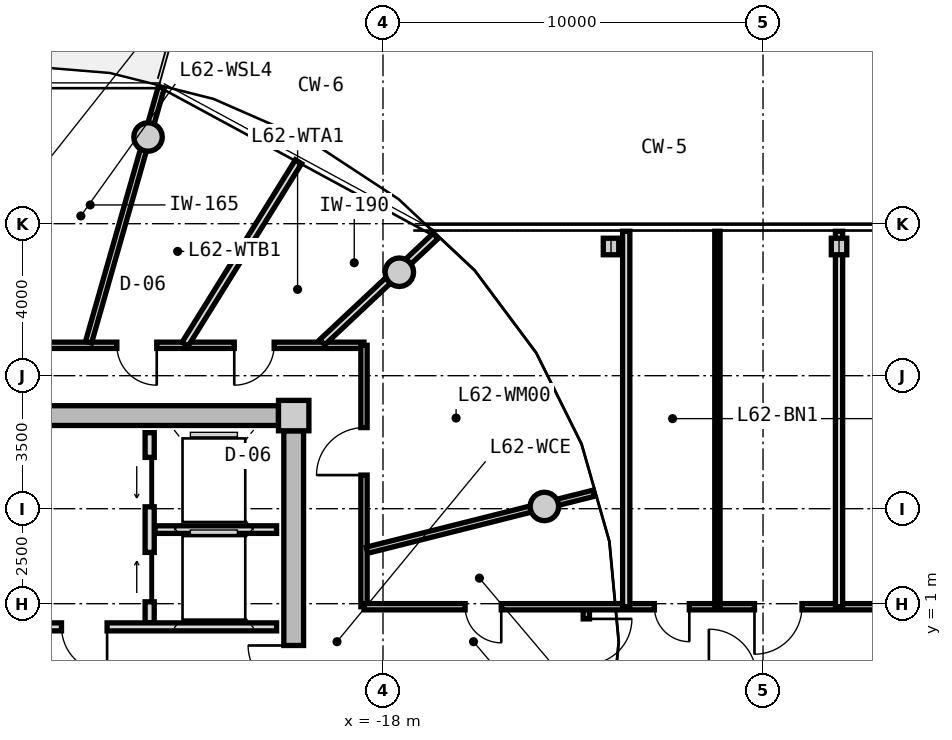
"""IFC4 building model, lengths in metres.
Left out: names, types, materials, properties, quantities, classifications, styles, units other than length and angle.
Written with IfcOpenShell. Run it as: python <this file> out.ifc"""

import sys

from ifc_helpers import new_model, si_unit, direction, frame, frame_2d, origin, origin_2d, place, context, subcontext, project, spatial, rectangle, circle, i_section, extrude, source, transform, mapped, element, fill, save


model = new_model("IFC4")
c1 = context("Model", 3, precision=1e-05, world=origin(), true_north=direction((0.0, 1.0)))
c2 = subcontext(c1, "Body", "Model", "MODEL_VIEW")
j1 = project(units=[si_unit("LENGTHUNIT", "METRE"), si_unit("PLANEANGLEUNIT", "RADIAN")], contexts=[c1])
p1 = place(None, origin())
s1 = spatial("IfcSite", under=j1, at=p1, CompositionType="ELEMENT")
p2 = place(p1, origin())
s2 = spatial("IfcBuilding", under=s1, at=p2, CompositionType="ELEMENT")
p3 = place(p2, frame((0.0, 0.0, 199.8)))
s3 = spatial("IfcBuildingStorey", under=s2, at=p3, CompositionType="ELEMENT", Elevation=199.8)
m1 = source(origin(), c2, "Body", "SweptSolid", [
    extrude(rectangle(XDim=0.8, YDim=0.8, at=origin_2d()), origin(), (0.0, 0.0, 1.0), 4.0),
])
p4 = place(p3, frame((-20.35, 5.95, 0.0), z_axis=(0.0, 0.0, 1.0), x_axis=(1.0, 0.0, 0.0)))
e1 = element("IfcColumn", 1, at=p4, inside=s3, PredefinedType="COLUMN", context=c2, shape_type="MappedRepresentation", body=[
    mapped(m1, transform((0.0, 0.0, 0.0), x_axis=(1.0, 0.0, 0.0), y_axis=(0.0, 1.0, 0.0), z_axis=(0.0, 0.0, 1.0), scale=1.0)),
])
m2 = source(origin(), c2, "Body", "SweptSolid", [
    extrude(rectangle(XDim=14.5, YDim=0.52, at=frame_2d((7.25, 0.0))), origin(), (0.0, 0.0, 1.0), 3.71),
])
p5 = place(p3, frame((-35.25, 5.95, 0.0), z_axis=(0.0, 0.0, 1.0), x_axis=(1.0, 0.0, 0.0)))
e2 = element("IfcWall", 2, at=p5, inside=s3, PredefinedType="SHEAR", context=c2, shape_type="MappedRepresentation", body=[
    mapped(m2, transform((0.0, 0.0, 0.0), x_axis=(1.0, 0.0, 0.0), y_axis=(0.0, 1.0, 0.0), z_axis=(0.0, 0.0, 1.0), scale=1.0)),
])
m3 = source(origin(), c2, "Body", "SweptSolid", [
    extrude(rectangle(XDim=11.1, YDim=0.52, at=frame_2d((5.55, 0.0))), origin(), (0.0, 0.0, 1.0), 3.71),
])
p6 = place(p3, frame((-20.35, 5.55, 0.0), z_axis=(0.0, 0.0, 1.0), x_axis=(0.0, -1.0, 0.0)))
e3 = element("IfcWall", 3, at=p6, inside=s3, PredefinedType="SHEAR", context=c2, shape_type="MappedRepresentation", body=[
    mapped(m3, transform((0.0, 0.0, 0.0), x_axis=(1.0, 0.0, 0.0), y_axis=(0.0, 1.0, 0.0), z_axis=(0.0, 0.0, 1.0), scale=1.0)),
])
p7 = place(p6, frame((5.65, 0.0, 0.0)))
e4 = element("IfcOpeningElement", 4, at=p7, cuts=e3, PredefinedType="OPENING", context=c2, shape_type="SweptSolid", body=[
    extrude(rectangle(XDim=1.2, YDim=2.15, at=frame_2d((0.6, 1.075))), frame((0.0, 0.27, 0.0), z_axis=(0.0, -1.0, 0.0), x_axis=(1.0, 0.0, 0.0)), (0.0, 0.0, 1.0), 0.54),
])
m4 = source(origin(), c2, "Body", "SweptSolid", [
    extrude(circle(Radius=0.375, at=origin_2d()), origin(), (0.0, 0.0, 1.0), 4.0),
])
for number, where, z_axis, x_axis in (
    (5, (-13.753, 3.559, 0.0), (0.0, 0.0, 1.0), (1.0, 0.0, 0.0)),
    (6, (-17.57, 9.723, 0.0), (0.0, 0.0, 1.0), (1.0, 0.0, 0.0)),
    (7, (-24.182, 13.281, 0.0), (0.0, 0.0, 1.0), (1.0, 0.0, 0.0)),
):
    element("IfcColumn", number, at=place(p3, frame(where, z_axis=z_axis, x_axis=x_axis)), inside=s3, PredefinedType="COLUMN", context=c2, shape_type="MappedRepresentation", body=[
        mapped(m4, transform((0.0, 0.0, 0.0), x_axis=(1.0, 0.0, 0.0), y_axis=(0.0, 1.0, 0.0), z_axis=(0.0, 0.0, 1.0), scale=1.0)),
    ])
m5 = source(origin(), c2, "Body", "SweptSolid", [
    extrude(i_section(OverallWidth=0.407, OverallDepth=0.435, WebThickness=0.024, FlangeThickness=0.039, FilletRadius=0.015, at=origin_2d()), origin(), (0.0, 0.0, 1.0), 4.42),
])
for number, where, z_axis, x_axis in (
    (8, (-12.0, 10.4, -0.42), (0.0, 0.0, 1.0), (1.0, 0.0, 0.0)),
    (9, (-6.0, 10.4, -0.42), (0.0, 0.0, 1.0), (1.0, 0.0, 0.0)),
):
    element("IfcColumn", number, at=place(p3, frame(where, z_axis=z_axis, x_axis=x_axis)), inside=s3, PredefinedType="COLUMN", context=c2, shape_type="MappedRepresentation", body=[
        mapped(m5, transform((0.0, 0.0, 0.0), x_axis=(1.0, 0.0, 0.0), y_axis=(0.0, 1.0, 0.0), z_axis=(0.0, 0.0, 1.0), scale=1.0)),
    ])
m6 = source(origin(), c2, "Body", "SweptSolid", [
    extrude(rectangle(XDim=5.0, YDim=0.24, at=frame_2d((2.5, 0.0))), origin(), (0.0, 0.0, 1.0), 3.695),
])
p8 = place(p3, frame((-24.14, 0.5, 0.0), z_axis=(0.0, 0.0, 1.0), x_axis=(0.0, 1.0, 0.0)))
e10 = element("IfcWall", 10, at=p8, inside=s3, PredefinedType="PARTITIONING", context=c2, shape_type="MappedRepresentation", body=[
    mapped(m6, transform((0.0, 0.0, 0.0), x_axis=(1.0, 0.0, 0.0), y_axis=(0.0, 1.0, 0.0), z_axis=(0.0, 0.0, 1.0), scale=1.0)),
])
p9 = place(p8, frame((3.05, 0.0, 0.0)))
e11 = element("IfcOpeningElement", 11, at=p9, cuts=e10, PredefinedType="OPENING", context=c2, shape_type="SweptSolid", body=[
    extrude(rectangle(XDim=1.3, YDim=2.2, at=frame_2d((0.65, 1.1))), frame((0.0, 0.13, 0.0), z_axis=(0.0, -1.0, 0.0), x_axis=(1.0, 0.0, 0.0)), (0.0, 0.0, 1.0), 0.26),
])
p10 = place(p8, frame((0.55, 0.0, 0.0)))
e12 = element("IfcOpeningElement", 12, at=p10, cuts=e10, PredefinedType="OPENING", context=c2, shape_type="SweptSolid", body=[
    extrude(rectangle(XDim=1.3, YDim=2.2, at=frame_2d((0.65, 1.1))), frame((0.0, 0.13, 0.0), z_axis=(0.0, -1.0, 0.0), x_axis=(1.0, 0.0, 0.0)), (0.0, 0.0, 1.0), 0.26),
])
m7 = source(origin(), c2, "Body", "SweptSolid", [
    extrude(rectangle(XDim=3.2, YDim=0.2, at=frame_2d((1.6, 0.0))), origin(), (0.0, 0.0, 1.0), 3.695),
])
p11 = place(p3, frame((-24.0, 2.95, 0.0), z_axis=(0.0, 0.0, 1.0), x_axis=(1.0, 0.0, 0.0)))
e13 = element("IfcWall", 13, at=p11, inside=s3, PredefinedType="PARTITIONING", context=c2, shape_type="MappedRepresentation", body=[
    mapped(m7, transform((0.0, 0.0, 0.0), x_axis=(1.0, 0.0, 0.0), y_axis=(0.0, 1.0, 0.0), z_axis=(0.0, 0.0, 1.0), scale=1.0)),
])
m8 = source(origin(), c2, "Body", "SweptSolid", [
    extrude(rectangle(XDim=6.66, YDim=0.21, at=frame_2d((3.33, 0.0))), origin(), (0.0, 0.0, 1.0), 3.695),
])
p12 = place(p3, frame((-27.46, 0.39, 0.0), z_axis=(0.0, 0.0, 1.0), x_axis=(1.0, 0.0, 0.0)))
e14 = element("IfcWall", 14, at=p12, inside=s3, PredefinedType="PARTITIONING", context=c2, shape_type="MappedRepresentation", body=[
    mapped(m8, transform((0.0, 0.0, 0.0), x_axis=(1.0, 0.0, 0.0), y_axis=(0.0, 1.0, 0.0), z_axis=(0.0, 0.0, 1.0), scale=1.0)),
])
p13 = place(p12, frame((1.0, 0.0, 0.0)))
e15 = element("IfcOpeningElement", 15, at=p13, cuts=e14, PredefinedType="OPENING", context=c2, shape_type="SweptSolid", body=[
    extrude(rectangle(XDim=1.2, YDim=2.15, at=frame_2d((0.6, 1.075))), frame((0.0, 0.115, 0.0), z_axis=(0.0, -1.0, 0.0), x_axis=(1.0, 0.0, 0.0)), (0.0, 0.0, 1.0), 0.23),
])
m9 = source(origin(), c2, "Body", "SweptSolid", [
    extrude(rectangle(XDim=8.58, YDim=0.165, at=frame_2d((4.29, 0.0))), origin(), (0.0, 0.0, 1.0), 3.695),
])
p14 = place(p3, frame((-27.08, 7.8, 0.0), z_axis=(0.0, 0.0, 1.0), x_axis=(1.0, 0.0, 0.0)))
e16 = element("IfcWall", 16, at=p14, inside=s3, PredefinedType="PARTITIONING", context=c2, shape_type="MappedRepresentation", body=[
    mapped(m9, transform((0.0, 0.0, 0.0), x_axis=(1.0, 0.0, 0.0), y_axis=(0.0, 1.0, 0.0), z_axis=(0.0, 0.0, 1.0), scale=1.0)),
])
p15 = place(p14, frame((5.166, 0.0, 0.0)))
e17 = element("IfcOpeningElement", 17, at=p15, cuts=e16, PredefinedType="OPENING", context=c2, shape_type="SweptSolid", body=[
    extrude(rectangle(XDim=1.05, YDim=2.15, at=frame_2d((0.525, 1.075))), frame((0.0, 0.093, 0.0), z_axis=(0.0, -1.0, 0.0), x_axis=(1.0, 0.0, 0.0)), (0.0, 0.0, 1.0), 0.185),
])
p16 = place(p14, frame((2.076, 0.0, 0.0)))
e18 = element("IfcOpeningElement", 18, at=p16, cuts=e16, PredefinedType="OPENING", context=c2, shape_type="SweptSolid", body=[
    extrude(rectangle(XDim=1.05, YDim=2.15, at=frame_2d((0.525, 1.075))), frame((0.0, 0.093, 0.0), z_axis=(0.0, -1.0, 0.0), x_axis=(1.0, 0.0, 0.0)), (0.0, 0.0, 1.0), 0.185),
])
m10 = source(origin(), c2, "Body", "SweptSolid", [
    extrude(rectangle(XDim=6.88, YDim=0.165, at=frame_2d((3.44, 0.0))), origin(), (0.0, 0.0, 1.0), 3.695),
])
p17 = place(p3, frame((-18.5, 7.8, 0.0), z_axis=(0.0, 0.0, 1.0), x_axis=(0.0, -1.0, 0.0)))
e19 = element("IfcWall", 19, at=p17, inside=s3, PredefinedType="PARTITIONING", context=c2, shape_type="MappedRepresentation", body=[
    mapped(m10, transform((0.0, 0.0, 0.0), x_axis=(1.0, 0.0, 0.0), y_axis=(0.0, 1.0, 0.0), z_axis=(0.0, 0.0, 1.0), scale=1.0)),
])
p18 = place(p17, frame((2.166, 0.0, 0.0)))
e20 = element("IfcOpeningElement", 20, at=p18, cuts=e19, PredefinedType="OPENING", context=c2, shape_type="SweptSolid", body=[
    extrude(rectangle(XDim=1.25, YDim=2.2, at=frame_2d((0.625, 1.1))), frame((0.0, 0.093, 0.0), z_axis=(0.0, -1.0, 0.0), x_axis=(1.0, 0.0, 0.0)), (0.0, 0.0, 1.0), 0.185),
])
m11 = source(origin(), c2, "Body", "SweptSolid", [
    extrude(rectangle(XDim=6.974, YDim=0.165, at=frame_2d((3.487, 0.0))), origin(), (0.0, 0.0, 1.0), 3.295),
])
p19 = place(p3, frame((-25.749, 7.88, 0.0), z_axis=(0.0, 0.0, 1.0), x_axis=(0.274707256801, 0.961527910703, 0.0)))
e21 = element("IfcWall", 21, at=p19, inside=s3, PredefinedType="PARTITIONING", context=c2, shape_type="MappedRepresentation", body=[
    mapped(m11, transform((0.0, 0.0, 0.0), x_axis=(1.0, 0.0, 0.0), y_axis=(0.0, 1.0, 0.0), z_axis=(0.0, 0.0, 1.0), scale=1.0)),
])
m12 = source(origin(), c2, "Body", "SweptSolid", [
    extrude(rectangle(XDim=6.157, YDim=0.165, at=frame_2d((3.079, 0.0))), origin(), (0.0, 0.0, 1.0), 3.295),
])
p20 = place(p3, frame((-18.42, 2.407, 0.0), z_axis=(0.0, 0.0, 1.0), x_axis=(0.969840867184, 0.243738984038, 0.0)))
e22 = element("IfcWall", 22, at=p20, inside=s3, PredefinedType="PARTITIONING", context=c2, shape_type="MappedRepresentation", body=[
    mapped(m12, transform((0.0, 0.0, 0.0), x_axis=(1.0, 0.0, 0.0), y_axis=(0.0, 1.0, 0.0), z_axis=(0.0, 0.0, 1.0), scale=1.0)),
])
m13 = source(origin(), c2, "Body", "SweptSolid", [
    extrude(rectangle(XDim=4.089, YDim=0.19, at=frame_2d((2.044, 0.0))), origin(), (0.0, 0.0, 1.0), 3.295),
])
p21 = place(p3, frame((-19.598, 7.88, 0.0), z_axis=(0.0, 0.0, 1.0), x_axis=(0.729401273609, 0.684086092577, 0.0)))
e23 = element("IfcWall", 23, at=p21, inside=s3, PredefinedType="PARTITIONING", context=c2, shape_type="MappedRepresentation", body=[
    mapped(m13, transform((0.0, 0.0, 0.0), x_axis=(1.0, 0.0, 0.0), y_axis=(0.0, 1.0, 0.0), z_axis=(0.0, 0.0, 1.0), scale=1.0)),
])
m14 = source(origin(), c2, "Body", "SweptSolid", [
    extrude(rectangle(XDim=5.652, YDim=0.19, at=frame_2d((2.826, 0.0))), origin(), (0.0, 0.0, 1.0), 3.695),
])
p22 = place(p3, frame((-23.206, 7.83, 0.0), z_axis=(0.0, 0.0, 1.0), x_axis=(0.527566076956, 0.84951399897, 0.0)))
e24 = element("IfcWall", 24, at=p22, inside=s3, PredefinedType="PARTITIONING", context=c2, shape_type="MappedRepresentation", body=[
    mapped(m14, transform((0.0, 0.0, 0.0), x_axis=(1.0, 0.0, 0.0), y_axis=(0.0, 1.0, 0.0), z_axis=(0.0, 0.0, 1.0), scale=1.0)),
])
m15 = source(origin(), c2, "Body", "SweptSolid", [
    extrude(rectangle(XDim=1.84, YDim=0.165, at=frame_2d((0.92, 0.0))), origin(), (0.0, 0.0, 1.0), 3.695),
])
p23 = place(p3, frame((-12.65, -0.92, 0.0), z_axis=(0.0, 0.0, 1.0), x_axis=(0.0, 1.0, 0.0)))
e25 = element("IfcWall", 25, at=p23, inside=s3, PredefinedType="PARTITIONING", context=c2, shape_type="MappedRepresentation", body=[
    mapped(m15, transform((0.0, 0.0, 0.0), x_axis=(1.0, 0.0, 0.0), y_axis=(0.0, 1.0, 0.0), z_axis=(0.0, 0.0, 1.0), scale=1.0)),
])
p24 = place(p23, frame((0.32, 0.0, 0.0)))
e26 = element("IfcOpeningElement", 26, at=p24, cuts=e25, PredefinedType="OPENING", context=c2, shape_type="SweptSolid", body=[
    extrude(rectangle(XDim=1.2, YDim=2.15, at=frame_2d((0.6, 1.075))), frame((0.0, 0.093, 0.0), z_axis=(0.0, -1.0, 0.0), x_axis=(1.0, 0.0, 0.0)), (0.0, 0.0, 1.0), 0.185),
])
m16 = source(origin(), c2, "Body", "SweptSolid", [
    extrude(rectangle(XDim=37.0, YDim=0.165, at=frame_2d((18.5, 0.0))), origin(), (0.0, 0.0, 1.0), 3.695),
])
p25 = place(p3, frame((-18.5, 0.92, 0.0), z_axis=(0.0, 0.0, 1.0), x_axis=(1.0, 0.0, 0.0)))
e27 = element("IfcWall", 27, at=p25, inside=s3, PredefinedType="PARTITIONING", context=c2, shape_type="MappedRepresentation", body=[
    mapped(m16, transform((0.0, 0.0, 0.0), x_axis=(1.0, 0.0, 0.0), y_axis=(0.0, 1.0, 0.0), z_axis=(0.0, 0.0, 1.0), scale=1.0)),
])
p26 = place(p25, frame((2.662, 0.0, 0.0)))
e28 = element("IfcOpeningElement", 28, at=p26, cuts=e27, PredefinedType="OPENING", context=c2, shape_type="SweptSolid", body=[
    extrude(rectangle(XDim=0.95, YDim=2.1, at=frame_2d((0.475, 1.05))), frame((0.0, 0.093, 0.0), z_axis=(0.0, -1.0, 0.0), x_axis=(1.0, 0.0, 0.0)), (0.0, 0.0, 1.0), 0.185),
])
p27 = place(p25, frame((33.388, 0.0, 0.0)))
e29 = element("IfcOpeningElement", 29, at=p27, cuts=e27, PredefinedType="OPENING", context=c2, shape_type="SweptSolid", body=[
    extrude(rectangle(XDim=0.95, YDim=2.1, at=frame_2d((0.475, 1.05))), frame((0.0, 0.093, 0.0), z_axis=(0.0, -1.0, 0.0), x_axis=(1.0, 0.0, 0.0)), (0.0, 0.0, 1.0), 0.185),
])
p28 = place(p25, frame((7.64, 0.0, 0.0)))
e30 = element("IfcOpeningElement", 30, at=p28, cuts=e27, PredefinedType="OPENING", context=c2, shape_type="SweptSolid", body=[
    extrude(rectangle(XDim=0.92, YDim=2.1, at=frame_2d((0.46, 1.05))), frame((0.0, 0.093, 0.0), z_axis=(0.0, -1.0, 0.0), x_axis=(1.0, 0.0, 0.0)), (0.0, 0.0, 1.0), 0.185),
])
p29 = place(p25, frame((10.275, 0.0, 0.0)))
e31 = element("IfcOpeningElement", 31, at=p29, cuts=e27, PredefinedType="OPENING", context=c2, shape_type="SweptSolid", body=[
    extrude(rectangle(XDim=1.25, YDim=2.2, at=frame_2d((0.625, 1.1))), frame((0.0, 0.093, 0.0), z_axis=(0.0, -1.0, 0.0), x_axis=(1.0, 0.0, 0.0)), (0.0, 0.0, 1.0), 0.185),
])
p30 = place(p25, frame((17.875, 0.0, 0.0)))
e32 = element("IfcOpeningElement", 32, at=p30, cuts=e27, PredefinedType="OPENING", context=c2, shape_type="SweptSolid", body=[
    extrude(rectangle(XDim=1.25, YDim=2.2, at=frame_2d((0.625, 1.1))), frame((0.0, 0.093, 0.0), z_axis=(0.0, -1.0, 0.0), x_axis=(1.0, 0.0, 0.0)), (0.0, 0.0, 1.0), 0.185),
])
p31 = place(p25, frame((26.675, 0.0, 0.0)))
e33 = element("IfcOpeningElement", 33, at=p31, cuts=e27, PredefinedType="OPENING", context=c2, shape_type="SweptSolid", body=[
    extrude(rectangle(XDim=1.25, YDim=2.2, at=frame_2d((0.625, 1.1))), frame((0.0, 0.093, 0.0), z_axis=(0.0, -1.0, 0.0), x_axis=(1.0, 0.0, 0.0)), (0.0, 0.0, 1.0), 0.185),
])
m17 = source(origin(), c2, "Body", "SweptSolid", [
    extrude(rectangle(XDim=9.88, YDim=0.19, at=frame_2d((4.94, 0.0))), origin(), (0.0, 0.0, 1.0), 3.695),
])
p32 = place(p3, frame((-11.6, 0.92, 0.0), z_axis=(0.0, 0.0, 1.0), x_axis=(0.0, 1.0, 0.0)))
e34 = element("IfcWall", 34, at=p32, inside=s3, PredefinedType="PARTITIONING", context=c2, shape_type="MappedRepresentation", body=[
    mapped(m17, transform((0.0, 0.0, 0.0), x_axis=(1.0, 0.0, 0.0), y_axis=(0.0, 1.0, 0.0), z_axis=(0.0, 0.0, 1.0), scale=1.0)),
])
m18 = source(origin(), c2, "Body", "SweptSolid", [
    extrude(rectangle(XDim=9.88, YDim=0.19, at=frame_2d((4.94, 0.0))), origin(), (0.0, 0.0, 1.0), 2.995),
])
p33 = place(p3, frame((-6.0, 0.92, 0.0), z_axis=(0.0, 0.0, 1.0), x_axis=(0.0, 1.0, 0.0)))
e35 = element("IfcWall", 35, at=p33, inside=s3, PredefinedType="PARTITIONING", context=c2, shape_type="MappedRepresentation", body=[
    mapped(m18, transform((0.0, 0.0, 0.0), x_axis=(1.0, 0.0, 0.0), y_axis=(0.0, 1.0, 0.0), z_axis=(0.0, 0.0, 1.0), scale=1.0)),
])
m19 = source(origin(), c2, "Body", "SweptSolid", [
    extrude(rectangle(XDim=9.88, YDim=0.14, at=frame_2d((4.94, 0.0))), origin(), (0.0, 0.0, 1.0), 3.695),
])
p34 = place(p3, frame((-9.2, 0.92, 0.0), z_axis=(0.0, 0.0, 1.0), x_axis=(0.0, 1.0, 0.0)))
e36 = element("IfcWall", 36, at=p34, inside=s3, PredefinedType="PARTITIONING", context=c2, shape_type="MappedRepresentation", body=[
    mapped(m19, transform((0.0, 0.0, 0.0), x_axis=(1.0, 0.0, 0.0), y_axis=(0.0, 1.0, 0.0), z_axis=(0.0, 0.0, 1.0), scale=1.0)),
])
m20 = source(origin(), c2, "Body", "SweptSolid", [
    extrude(rectangle(XDim=1.3, YDim=2.2, at=frame_2d((0.65, 1.1))), frame((0.0, 0.025, 0.0), z_axis=(0.0, -1.0, 0.0), x_axis=(1.0, 0.0, 0.0)), (0.0, 0.0, 1.0), 0.05),
])
p35 = place(p9, origin())
e37 = element("IfcDoor", 37, at=p35, inside=s3, OperationType="SLIDING_TO_LEFT", PredefinedType="DOOR", context=c2, shape_type="MappedRepresentation", body=[
    mapped(m20, transform((0.0, 0.0, 0.0), x_axis=(1.0, 0.0, 0.0), y_axis=(0.0, 1.0, 0.0), z_axis=(0.0, 0.0, 1.0), scale=1.0)),
])
fill(e11, e37)
p36 = place(p10, origin())
e38 = element("IfcDoor", 38, at=p36, inside=s3, OperationType="SLIDING_TO_RIGHT", PredefinedType="DOOR", context=c2, shape_type="MappedRepresentation", body=[
    mapped(m20, transform((0.0, 0.0, 0.0), x_axis=(1.0, 0.0, 0.0), y_axis=(0.0, 1.0, 0.0), z_axis=(0.0, 0.0, 1.0), scale=1.0)),
])
fill(e12, e38)
m21 = source(origin(), c2, "Body", "SweptSolid", [
    extrude(rectangle(XDim=1.2, YDim=2.15, at=frame_2d((0.6, 1.075))), frame((0.0, 0.025, 0.0), z_axis=(0.0, -1.0, 0.0), x_axis=(1.0, 0.0, 0.0)), (0.0, 0.0, 1.0), 0.05),
])
p37 = place(p13, frame((1.2, 0.0, 0.0), z_axis=(0.0, 0.0, 1.0), x_axis=(-1.0, 0.0, 0.0)))
e39 = element("IfcDoor", 39, at=p37, inside=s3, OperationType="SINGLE_SWING_LEFT", PredefinedType="DOOR", context=c2, shape_type="MappedRepresentation", body=[
    mapped(m21, transform((0.0, 0.0, 0.0), x_axis=(1.0, 0.0, 0.0), y_axis=(0.0, 1.0, 0.0), z_axis=(0.0, 0.0, 1.0), scale=1.0)),
])
fill(e15, e39)
p38 = place(p7, frame((1.2, 0.0, 0.0), z_axis=(0.0, 0.0, 1.0), x_axis=(-1.0, 0.0, 0.0)))
e40 = element("IfcDoor", 40, at=p38, inside=s3, OperationType="SINGLE_SWING_RIGHT", PredefinedType="DOOR", context=c2, shape_type="MappedRepresentation", body=[
    mapped(m21, transform((0.0, 0.0, 0.0), x_axis=(1.0, 0.0, 0.0), y_axis=(0.0, 1.0, 0.0), z_axis=(0.0, 0.0, 1.0), scale=1.0)),
])
fill(e4, e40)
m22 = source(origin(), c2, "Body", "SweptSolid", [
    extrude(rectangle(XDim=0.95, YDim=2.1, at=frame_2d((0.475, 1.05))), frame((0.0, 0.025, 0.0), z_axis=(0.0, -1.0, 0.0), x_axis=(1.0, 0.0, 0.0)), (0.0, 0.0, 1.0), 0.05),
])
p39 = place(p26, frame((0.95, 0.0, 0.0), z_axis=(0.0, 0.0, 1.0), x_axis=(-1.0, 0.0, 0.0)))
e41 = element("IfcDoor", 41, at=p39, inside=s3, OperationType="SINGLE_SWING_LEFT", PredefinedType="DOOR", context=c2, shape_type="MappedRepresentation", body=[
    mapped(m22, transform((0.0, 0.0, 0.0), x_axis=(1.0, 0.0, 0.0), y_axis=(0.0, 1.0, 0.0), z_axis=(0.0, 0.0, 1.0), scale=1.0)),
])
fill(e28, e41)
m23 = source(origin(), c2, "Body", "SweptSolid", [
    extrude(rectangle(XDim=1.25, YDim=2.2, at=frame_2d((0.625, 1.1))), frame((0.0, 0.025, 0.0), z_axis=(0.0, -1.0, 0.0), x_axis=(1.0, 0.0, 0.0)), (0.0, 0.0, 1.0), 0.05),
])
p40 = place(p18, frame((1.25, 0.0, 0.0), z_axis=(0.0, 0.0, 1.0), x_axis=(-1.0, 0.0, 0.0)))
e42 = element("IfcDoor", 42, at=p40, inside=s3, OperationType="SINGLE_SWING_LEFT", PredefinedType="DOOR", context=c2, shape_type="MappedRepresentation", body=[
    mapped(m23, transform((0.0, 0.0, 0.0), x_axis=(1.0, 0.0, 0.0), y_axis=(0.0, 1.0, 0.0), z_axis=(0.0, 0.0, 1.0), scale=1.0)),
])
fill(e20, e42)
m24 = source(origin(), c2, "Body", "SweptSolid", [
    extrude(rectangle(XDim=1.05, YDim=2.15, at=frame_2d((0.525, 1.075))), frame((0.0, 0.025, 0.0), z_axis=(0.0, -1.0, 0.0), x_axis=(1.0, 0.0, 0.0)), (0.0, 0.0, 1.0), 0.05),
])
p41 = place(p15, frame((1.05, 0.0, 0.0), z_axis=(0.0, 0.0, 1.0), x_axis=(-1.0, 0.0, 0.0)))
e43 = element("IfcDoor", 43, at=p41, inside=s3, OperationType="SINGLE_SWING_RIGHT", PredefinedType="DOOR", context=c2, shape_type="MappedRepresentation", body=[
    mapped(m24, transform((0.0, 0.0, 0.0), x_axis=(1.0, 0.0, 0.0), y_axis=(0.0, 1.0, 0.0), z_axis=(0.0, 0.0, 1.0), scale=1.0)),
])
fill(e17, e43)
p42 = place(p16, frame((1.05, 0.0, 0.0), z_axis=(0.0, 0.0, 1.0), x_axis=(-1.0, 0.0, 0.0)))
e44 = element("IfcDoor", 44, at=p42, inside=s3, OperationType="SINGLE_SWING_LEFT", PredefinedType="DOOR", context=c2, shape_type="MappedRepresentation", body=[
    mapped(m24, transform((0.0, 0.0, 0.0), x_axis=(1.0, 0.0, 0.0), y_axis=(0.0, 1.0, 0.0), z_axis=(0.0, 0.0, 1.0), scale=1.0)),
])
fill(e18, e44)
p43 = place(p24, frame((1.2, 0.0, 0.0), z_axis=(0.0, 0.0, 1.0), x_axis=(-1.0, 0.0, 0.0)))
e45 = element("IfcDoor", 45, at=p43, inside=s3, OperationType="SINGLE_SWING_LEFT", PredefinedType="DOOR", context=c2, shape_type="MappedRepresentation", body=[
    mapped(m21, transform((0.0, 0.0, 0.0), x_axis=(1.0, 0.0, 0.0), y_axis=(0.0, 1.0, 0.0), z_axis=(0.0, 0.0, 1.0), scale=1.0)),
])
fill(e26, e45)
m25 = source(origin(), c2, "Body", "SweptSolid", [
    extrude(rectangle(XDim=0.92, YDim=2.1, at=frame_2d((0.46, 1.05))), frame((0.0, 0.025, 0.0), z_axis=(0.0, -1.0, 0.0), x_axis=(1.0, 0.0, 0.0)), (0.0, 0.0, 1.0), 0.05),
])
p44 = place(p28, frame((0.92, 0.0, 0.0), z_axis=(0.0, 0.0, 1.0), x_axis=(-1.0, 0.0, 0.0)))
e46 = element("IfcDoor", 46, at=p44, inside=s3, OperationType="SINGLE_SWING_LEFT", PredefinedType="DOOR", context=c2, shape_type="MappedRepresentation", body=[
    mapped(m25, transform((0.0, 0.0, 0.0), x_axis=(1.0, 0.0, 0.0), y_axis=(0.0, 1.0, 0.0), z_axis=(0.0, 0.0, 1.0), scale=1.0)),
])
fill(e30, e46)
p45 = place(p29, frame((1.25, 0.0, 0.0), z_axis=(0.0, 0.0, 1.0), x_axis=(-1.0, 0.0, 0.0)))
e47 = element("IfcDoor", 47, at=p45, inside=s3, OperationType="SINGLE_SWING_RIGHT", PredefinedType="DOOR", context=c2, shape_type="MappedRepresentation", body=[
    mapped(m23, transform((0.0, 0.0, 0.0), x_axis=(1.0, 0.0, 0.0), y_axis=(0.0, 1.0, 0.0), z_axis=(0.0, 0.0, 1.0), scale=1.0)),
])
fill(e31, e47)
save(model, sys.argv[1])
